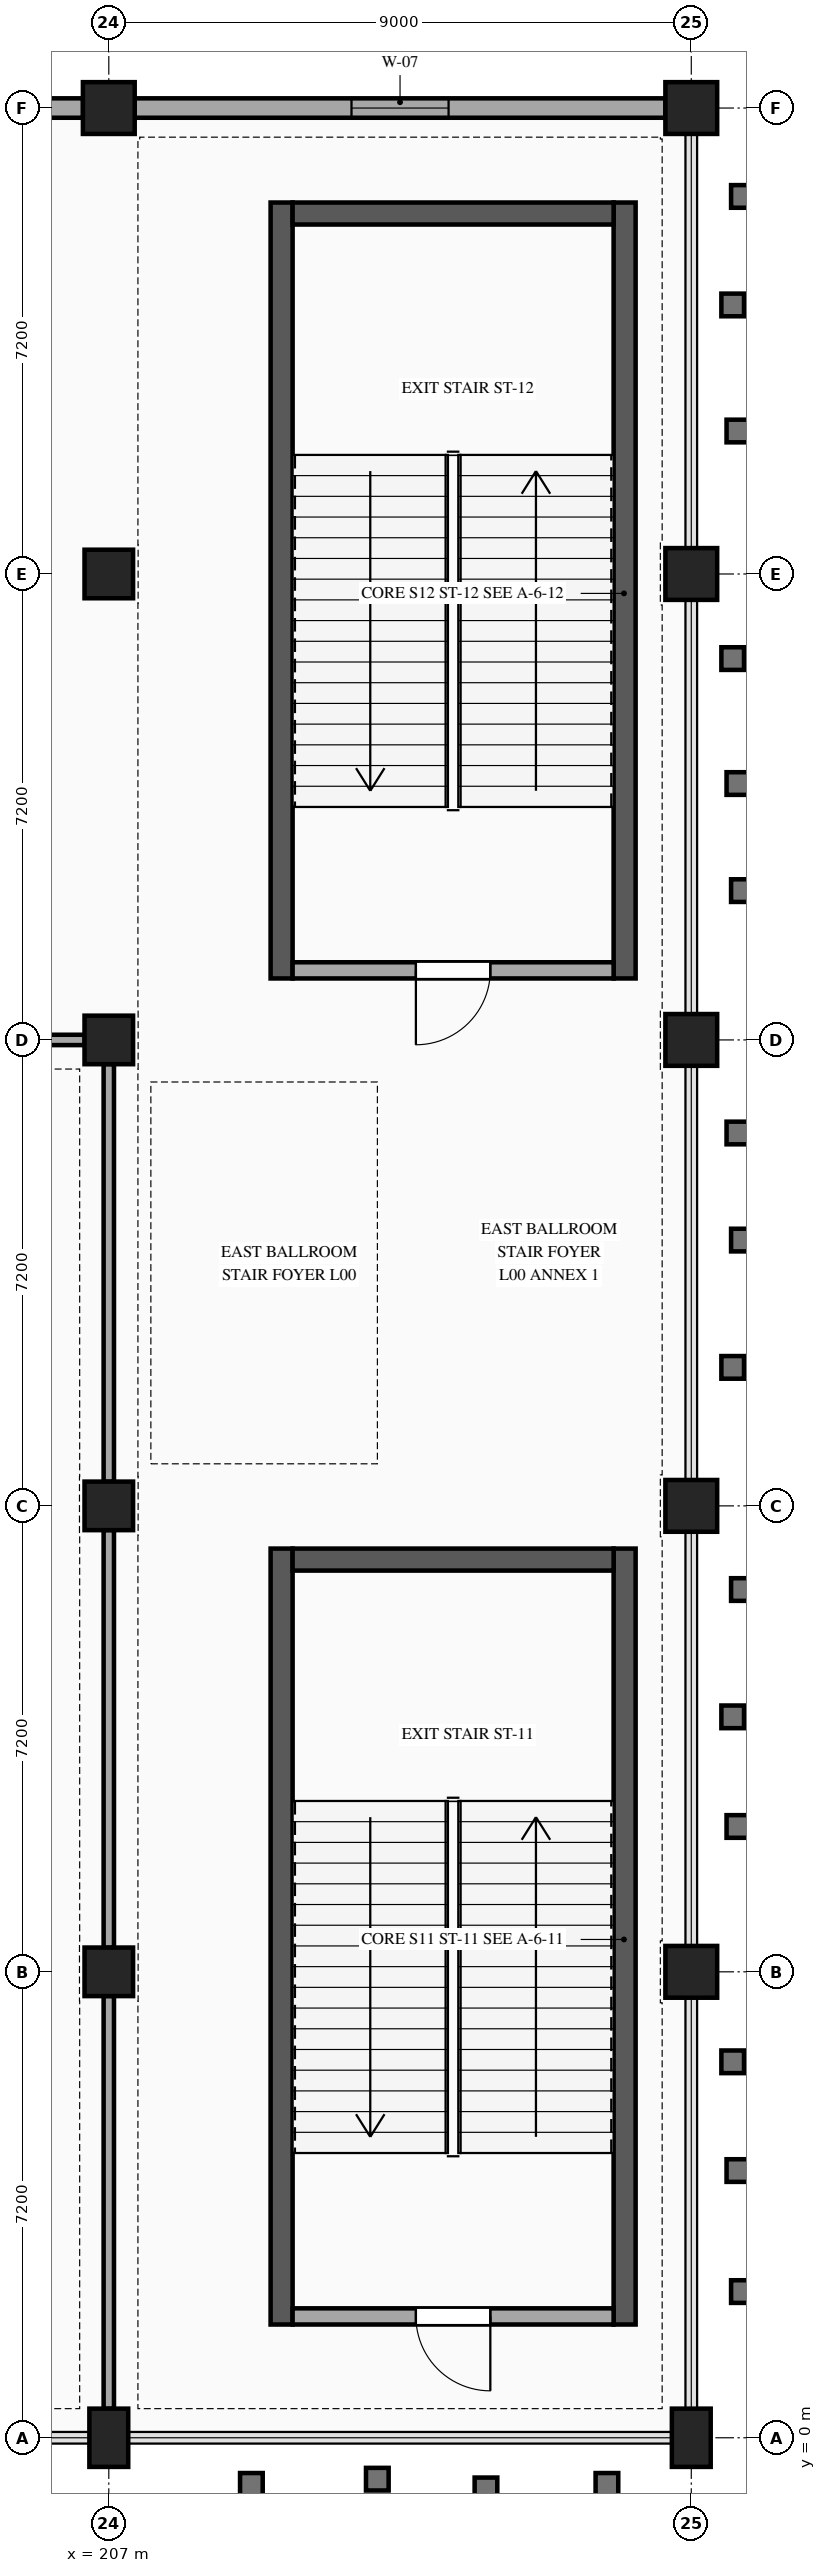
"""IFC4 building model, lengths in metres.
Left out: names, types, materials, properties, quantities, classifications, styles, units other than length and angle.
Written with IfcOpenShell. Run it as: python <this file> out.ifc"""

import sys

from ifc_helpers import new_model, si_unit, direction, frame, frame_2d, origin, origin_2d, place, context, subcontext, project, spatial, rectangle, extrude, element, fill, save


model = new_model("IFC4")
c1 = context("Model", 3, precision=1e-05, world=origin(), true_north=direction((0.0, 1.0)))
c2 = subcontext(c1, "Body", "Model", "MODEL_VIEW")
j1 = project(units=[si_unit("LENGTHUNIT", "METRE"), si_unit("PLANEANGLEUNIT", "RADIAN")], contexts=[c1])
p1 = place(None, origin())
s1 = spatial("IfcSite", under=j1, at=p1, CompositionType="ELEMENT")
p2 = place(p1, origin())
s2 = spatial("IfcBuilding", under=s1, at=p2, CompositionType="ELEMENT")
p3 = place(p2, origin())
s3 = spatial("IfcBuildingStorey", under=s2, at=p3, CompositionType="ELEMENT", Elevation=0.0)
p4 = place(p3, frame((207.0, 0.0, 0.0), z_axis=(0.0, 0.0, 1.0), x_axis=(1.0, 0.0, 0.0)))
e1 = element("IfcColumn", 1, at=p4, inside=s3, PredefinedType="COLUMN", context=c2, shape_type="SweptSolid", body=[
    extrude(rectangle(XDim=0.6, YDim=0.9, at=origin_2d()), origin(), (0.0, 0.0, 1.0), 5.4),
])
for number, where, z_axis, x_axis in (
    (2, (207.0, 7.2, 0.0), (0.0, 0.0, 1.0), (1.0, 0.0, 0.0)),
    (3, (207.0, 14.4, 0.0), (0.0, 0.0, 1.0), (1.0, 0.0, 0.0)),
    (4, (207.0, 21.6, 0.0), (0.0, 0.0, 1.0), (1.0, 0.0, 0.0)),
    (5, (207.0, 28.8, 0.0), (0.0, 0.0, 1.0), (1.0, 0.0, 0.0)),
):
    element("IfcColumn", number, at=place(p3, frame(where, z_axis=z_axis, x_axis=x_axis)), inside=s3, PredefinedType="COLUMN", context=c2, shape_type="SweptSolid", body=[
        extrude(rectangle(XDim=0.75, YDim=0.75, at=origin_2d()), origin(), (0.0, 0.0, 1.0), 5.4),
    ])
p5 = place(p3, frame((207.0, 36.0, 0.0), z_axis=(0.0, 0.0, 1.0), x_axis=(1.0, 0.0, 0.0)))
e6 = element("IfcColumn", 6, at=p5, inside=s3, PredefinedType="COLUMN", context=c2, shape_type="SweptSolid", body=[
    extrude(rectangle(XDim=0.8, YDim=0.8, at=origin_2d()), origin(), (0.0, 0.0, 1.0), 5.4),
])
p6 = place(p3, frame((216.0, 0.0, 0.0), z_axis=(0.0, 0.0, 1.0), x_axis=(1.0, 0.0, 0.0)))
e7 = element("IfcColumn", 7, at=p6, inside=s3, PredefinedType="COLUMN", context=c2, shape_type="SweptSolid", body=[
    extrude(rectangle(XDim=0.6, YDim=0.9, at=origin_2d()), origin(), (0.0, 0.0, 1.0), 5.4),
])
for number, where, z_axis, x_axis in (
    (8, (216.0, 7.2, 0.0), (0.0, 0.0, 1.0), (1.0, 0.0, 0.0)),
    (9, (216.0, 14.4, 0.0), (0.0, 0.0, 1.0), (1.0, 0.0, 0.0)),
    (10, (216.0, 21.6, 0.0), (0.0, 0.0, 1.0), (1.0, 0.0, 0.0)),
    (11, (216.0, 28.8, 0.0), (0.0, 0.0, 1.0), (1.0, 0.0, 0.0)),
    (12, (216.0, 36.0, 0.0), (0.0, 0.0, 1.0), (1.0, 0.0, 0.0)),
):
    element("IfcColumn", number, at=place(p3, frame(where, z_axis=z_axis, x_axis=x_axis)), inside=s3, PredefinedType="COLUMN", context=c2, shape_type="SweptSolid", body=[
        extrude(rectangle(XDim=0.8, YDim=0.8, at=origin_2d()), origin(), (0.0, 0.0, 1.0), 5.4),
    ])
for number, where, z_axis, x_axis in (
    (13, (209.67, 1.75, 0.0), (0.0, 0.0, 1.0), (0.0, 1.0, 0.0)),
    (14, (214.97, 13.74, 0.0), (0.0, 0.0, 1.0), (0.0, -1.0, 0.0)),
):
    element("IfcWall", number, at=place(p3, frame(where, z_axis=z_axis, x_axis=x_axis)), inside=s3, PredefinedType="SHEAR", context=c2, shape_type="SweptSolid", body=[
        extrude(rectangle(XDim=11.99, YDim=0.34, at=frame_2d((5.995, 0.0))), origin(), (0.0, 0.0, 1.0), 5.12),
    ])
p7 = place(p3, frame((209.84, 13.57, 0.0), z_axis=(0.0, 0.0, 1.0), x_axis=(1.0, 0.0, 0.0)))
e15 = element("IfcWall", 15, at=p7, inside=s3, PredefinedType="SHEAR", context=c2, shape_type="SweptSolid", body=[
    extrude(rectangle(XDim=4.96, YDim=0.34, at=frame_2d((2.48, 0.0))), origin(), (0.0, 0.0, 1.0), 5.12),
])
for number, where, z_axis, x_axis in (
    (16, (209.67, 22.55, 0.0), (0.0, 0.0, 1.0), (0.0, 1.0, 0.0)),
    (17, (214.97, 34.54, 0.0), (0.0, 0.0, 1.0), (0.0, -1.0, 0.0)),
):
    element("IfcWall", number, at=place(p3, frame(where, z_axis=z_axis, x_axis=x_axis)), inside=s3, PredefinedType="SHEAR", context=c2, shape_type="SweptSolid", body=[
        extrude(rectangle(XDim=11.99, YDim=0.34, at=frame_2d((5.995, 0.0))), origin(), (0.0, 0.0, 1.0), 5.12),
    ])
p8 = place(p3, frame((209.84, 34.37, 0.0), z_axis=(0.0, 0.0, 1.0), x_axis=(1.0, 0.0, 0.0)))
e18 = element("IfcWall", 18, at=p8, inside=s3, PredefinedType="SHEAR", context=c2, shape_type="SweptSolid", body=[
    extrude(rectangle(XDim=4.96, YDim=0.34, at=frame_2d((2.48, 0.0))), origin(), (0.0, 0.0, 1.0), 5.12),
])
p9 = place(p3, frame((198.398, 36.0, 0.0), z_axis=(0.0, 0.0, 1.0), x_axis=(1.0, 0.0, 0.0)))
e19 = element("IfcWall", 19, at=p9, inside=s3, PredefinedType="STANDARD", context=c2, shape_type="SweptSolid", body=[
    extrude(rectangle(XDim=8.204, YDim=0.3, at=frame_2d((4.102, 0.0))), origin(), (0.0, 0.0, 1.0), 4.747),
])
p10 = place(p9, frame((3.202, 0.0, 0.9)))
e20 = element("IfcOpeningElement", 20, at=p10, cuts=e19, PredefinedType="OPENING", context=c2, shape_type="SweptSolid", body=[
    extrude(rectangle(XDim=1.8, YDim=1.8, at=frame_2d((0.9, 0.9))), frame((0.0, 0.16, 0.0), z_axis=(0.0, -1.0, 0.0), x_axis=(1.0, 0.0, 0.0)), (0.0, 0.0, 1.0), 0.32),
])
p11 = place(p3, frame((207.398, 36.0, 0.0), z_axis=(0.0, 0.0, 1.0), x_axis=(1.0, 0.0, 0.0)))
e21 = element("IfcWall", 21, at=p11, inside=s3, PredefinedType="STANDARD", context=c2, shape_type="SweptSolid", body=[
    extrude(rectangle(XDim=8.204, YDim=0.3, at=frame_2d((4.102, 0.0))), origin(), (0.0, 0.0, 1.0), 4.747),
])
p12 = place(p11, frame((3.352, 0.0, 0.9)))
e22 = element("IfcOpeningElement", 22, at=p12, cuts=e21, PredefinedType="OPENING", context=c2, shape_type="SweptSolid", body=[
    extrude(rectangle(XDim=1.5, YDim=1.6, at=frame_2d((0.75, 0.8))), frame((0.0, 0.16, 0.0), z_axis=(0.0, -1.0, 0.0), x_axis=(1.0, 0.0, 0.0)), (0.0, 0.0, 1.0), 0.32),
])
p13 = place(p3, frame((214.8, 1.875, 0.0), z_axis=(0.0, 0.0, 1.0), x_axis=(-1.0, 0.0, 0.0)))
e23 = element("IfcWall", 23, at=p13, inside=s3, PredefinedType="STANDARD", context=c2, shape_type="SweptSolid", body=[
    extrude(rectangle(XDim=4.96, YDim=0.25, at=frame_2d((2.48, 0.0))), origin(), (0.0, 0.0, 1.0), 5.08),
])
p14 = place(p13, frame((1.905, 0.0, 0.0)))
e24 = element("IfcOpeningElement", 24, at=p14, cuts=e23, PredefinedType="OPENING", context=c2, shape_type="SweptSolid", body=[
    extrude(rectangle(XDim=1.15, YDim=2.2, at=frame_2d((0.575, 1.1))), frame((0.0, 0.135, 0.0), z_axis=(0.0, -1.0, 0.0), x_axis=(1.0, 0.0, 0.0)), (0.0, 0.0, 1.0), 0.27),
])
p15 = place(p3, frame((214.8, 22.675, 0.0), z_axis=(0.0, 0.0, 1.0), x_axis=(-1.0, 0.0, 0.0)))
e25 = element("IfcWall", 25, at=p15, inside=s3, PredefinedType="STANDARD", context=c2, shape_type="SweptSolid", body=[
    extrude(rectangle(XDim=4.96, YDim=0.25, at=frame_2d((2.48, 0.0))), origin(), (0.0, 0.0, 1.0), 5.08),
])
p16 = place(p15, frame((1.905, 0.0, 0.0)))
e26 = element("IfcOpeningElement", 26, at=p16, cuts=e25, PredefinedType="OPENING", context=c2, shape_type="SweptSolid", body=[
    extrude(rectangle(XDim=1.15, YDim=2.2, at=frame_2d((0.575, 1.1))), frame((0.0, 0.135, 0.0), z_axis=(0.0, -1.0, 0.0), x_axis=(1.0, 0.0, 0.0)), (0.0, 0.0, 1.0), 0.27),
])
p17 = place(p3, frame((198.373, 21.6, 0.0), z_axis=(0.0, 0.0, 1.0), x_axis=(1.0, 0.0, 0.0)))
e27 = element("IfcWall", 27, at=p17, inside=s3, PredefinedType="PARTITIONING", context=c2, shape_type="SweptSolid", body=[
    extrude(rectangle(XDim=8.254, YDim=0.16, at=frame_2d((4.127, 0.0))), origin(), (0.0, 0.0, 1.0), 4.264),
])
p18 = place(p3, frame((207.0, 0.448, 0.0), z_axis=(0.0, 0.0, 1.0), x_axis=(0.0, 1.0, 0.0)))
e28 = element("IfcWall", 28, at=p18, inside=s3, PredefinedType="PARTITIONING", context=c2, shape_type="SweptSolid", body=[
    extrude(rectangle(XDim=6.379, YDim=0.16, at=frame_2d((3.189, 0.0))), origin(), (0.0, 0.0, 1.0), 4.264),
])
for number, where, z_axis, x_axis in (
    (29, (207.0, 7.573, 0.0), (0.0, 0.0, 1.0), (0.0, 1.0, 0.0)),
    (30, (207.0, 14.773, 0.0), (0.0, 0.0, 1.0), (0.0, 1.0, 0.0)),
):
    element("IfcWall", number, at=place(p3, frame(where, z_axis=z_axis, x_axis=x_axis)), inside=s3, PredefinedType="PARTITIONING", context=c2, shape_type="SweptSolid", body=[
        extrude(rectangle(XDim=6.454, YDim=0.16, at=frame_2d((3.227, 0.0))), origin(), (0.0, 0.0, 1.0), 4.264),
    ])
p19 = place(p12, origin())
e31 = element("IfcWindow", 31, at=p19, inside=s3, PartitioningType="SINGLE_PANEL", PredefinedType="WINDOW", context=c2, shape_type="SweptSolid", body=[
    extrude(rectangle(XDim=1.5, YDim=1.6, at=frame_2d((0.75, 0.8))), frame((0.0, 0.03, 0.0), z_axis=(0.0, -1.0, 0.0), x_axis=(1.0, 0.0, 0.0)), (0.0, 0.0, 1.0), 0.06),
])
fill(e22, e31)
p20 = place(p14, origin())
e32 = element("IfcDoor", 32, at=p20, inside=s3, OperationType="SINGLE_SWING_LEFT", PredefinedType="DOOR", context=c2, shape_type="SweptSolid", body=[
    extrude(rectangle(XDim=1.15, YDim=2.2, at=frame_2d((0.575, 1.1))), frame((0.0, 0.025, 0.0), z_axis=(0.0, -1.0, 0.0), x_axis=(1.0, 0.0, 0.0)), (0.0, 0.0, 1.0), 0.05),
])
fill(e24, e32)
p21 = place(p16, origin())
e33 = element("IfcDoor", 33, at=p21, inside=s3, OperationType="SINGLE_SWING_RIGHT", PredefinedType="DOOR", context=c2, shape_type="SweptSolid", body=[
    extrude(rectangle(XDim=1.15, YDim=2.2, at=frame_2d((0.575, 1.1))), frame((0.0, 0.025, 0.0), z_axis=(0.0, -1.0, 0.0), x_axis=(1.0, 0.0, 0.0)), (0.0, 0.0, 1.0), 0.05),
])
fill(e26, e33)
save(model, sys.argv[1])
